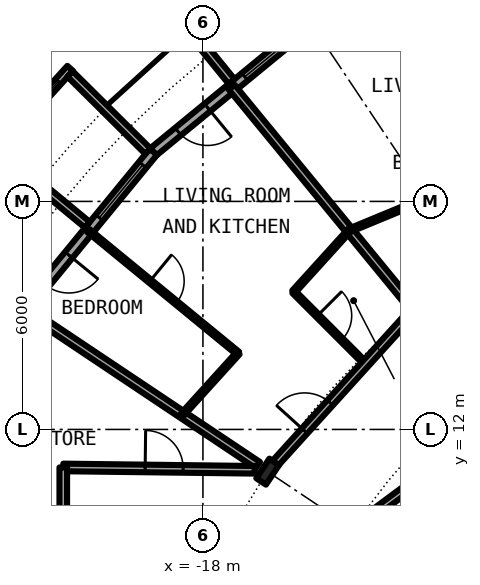
"""IFC4 building model, lengths in metres.
Left out: names, types, materials, properties, quantities, classifications, styles, units other than length and angle.
Written with IfcOpenShell. Run it as: python <this file> out.ifc"""

import sys

from ifc_helpers import new_model, si_unit, direction, frame, frame_2d, origin, origin_2d, place, context, subcontext, project, spatial, rectangle, circle, i_section, extrude, element, fill, save


model = new_model("IFC4")
c1 = context("Model", 3, precision=1e-05, world=origin(), true_north=direction((0.0, 1.0)))
c2 = subcontext(c1, "Body", "Model", "MODEL_VIEW")
j1 = project(units=[si_unit("LENGTHUNIT", "METRE"), si_unit("PLANEANGLEUNIT", "RADIAN")], contexts=[c1])
p1 = place(None, origin())
s1 = spatial("IfcSite", under=j1, at=p1, CompositionType="ELEMENT")
p2 = place(p1, origin())
s2 = spatial("IfcBuilding", under=s1, at=p2, CompositionType="ELEMENT")
p3 = place(p2, frame((0.0, 0.0, 47.2)))
s3 = spatial("IfcBuildingStorey", under=s2, at=p3, CompositionType="ELEMENT", Elevation=47.2)
p4 = place(p3, frame((-16.297, 10.889, 0.0), z_axis=(0.0, 0.0, 1.0), x_axis=(-0.831469612303, 0.55557023302, 0.0)))
e1 = element("IfcColumn", 1, at=p4, inside=s3, PredefinedType="COLUMN", context=c2, shape_type="SweptSolid", body=[
    extrude(i_section(OverallWidth=0.305, OverallDepth=0.62, WebThickness=0.021, FlangeThickness=0.04, FilletRadius=0.027, at=origin_2d()), origin(), (0.0, 0.0, 1.0), 3.05),
])
p5 = place(p3, frame((-15.167, 22.699, 0.0), z_axis=(0.0, 0.0, 1.0), x_axis=(-0.773019449054, -0.634382322723, 0.0)))
e2 = element("IfcWall", 2, at=p5, inside=s3, PredefinedType="SOLIDWALL", context=c2, shape_type="SweptSolid", body=[
    extrude(rectangle(XDim=5.352, YDim=0.25, at=frame_2d((2.676, 0.0))), origin(), (0.0, 0.0, 1.0), 2.7),
])
p6 = place(p5, frame((0.441, 0.0, 0.3)))
e3 = element("IfcOpeningElement", 3, at=p6, cuts=e2, PredefinedType="OPENING", context=c2, shape_type="SweptSolid", body=[
    extrude(rectangle(XDim=1.8, YDim=2.1, at=frame_2d((0.9, 1.05))), frame((0.0, 0.135, 0.0), z_axis=(0.0, -1.0, 0.0), x_axis=(1.0, 0.0, 0.0)), (0.0, 0.0, 1.0), 0.27),
])
p7 = place(p5, frame((3.51, 0.0, 0.0)))
e4 = element("IfcOpeningElement", 4, at=p7, cuts=e2, PredefinedType="OPENING", context=c2, shape_type="SweptSolid", body=[
    extrude(rectangle(XDim=1.0, YDim=2.2, at=frame_2d((0.5, 1.1))), frame((0.0, 0.135, 0.0), z_axis=(0.0, -1.0, 0.0), x_axis=(1.0, 0.0, 0.0)), (0.0, 0.0, 1.0), 0.27),
])
p8 = place(p3, frame((-17.246, 21.155, -0.03), z_axis=(0.0, 0.0, 1.0), x_axis=(-0.631741648902, 0.775179004516, 0.0)))
e5 = element("IfcWall", 5, at=p8, inside=s3, PredefinedType="SOLIDWALL", context=c2, shape_type="SweptSolid", body=[
    extrude(rectangle(XDim=3.006, YDim=0.2, at=frame_2d((1.503, 0.0))), origin(), (0.0, 0.0, 1.0), 2.73),
])
p9 = place(p3, frame((-19.304, 19.304, 0.0), z_axis=(0.0, 0.0, 1.0), x_axis=(-0.634382322723, -0.773019449054, 0.0)))
e6 = element("IfcWall", 6, at=p9, inside=s3, PredefinedType="SOLIDWALL", context=c2, shape_type="SweptSolid", body=[
    extrude(rectangle(XDim=5.352, YDim=0.25, at=frame_2d((2.676, 0.0))), origin(), (0.0, 0.0, 1.0), 2.7),
])
p10 = place(p9, frame((0.441, 0.0, 0.3)))
e7 = element("IfcOpeningElement", 7, at=p10, cuts=e6, PredefinedType="OPENING", context=c2, shape_type="SweptSolid", body=[
    extrude(rectangle(XDim=1.8, YDim=2.1, at=frame_2d((0.9, 1.05))), frame((0.0, 0.135, 0.0), z_axis=(0.0, -1.0, 0.0), x_axis=(1.0, 0.0, 0.0)), (0.0, 0.0, 1.0), 0.27),
])
p11 = place(p9, frame((3.51, 0.0, 0.0)))
e8 = element("IfcOpeningElement", 8, at=p11, cuts=e6, PredefinedType="OPENING", context=c2, shape_type="SweptSolid", body=[
    extrude(rectangle(XDim=1.0, YDim=2.2, at=frame_2d((0.5, 1.1))), frame((0.0, 0.135, 0.0), z_axis=(0.0, -1.0, 0.0), x_axis=(1.0, 0.0, 0.0)), (0.0, 0.0, 1.0), 0.27),
])
p12 = place(p3, frame((-21.493, 21.5, -0.03), z_axis=(0.0, 0.0, 1.0), x_axis=(-0.671506829416, -0.740998365753, 0.0)))
e9 = element("IfcWall", 9, at=p12, inside=s3, PredefinedType="SOLIDWALL", context=c2, shape_type="SweptSolid", body=[
    extrude(rectangle(XDim=2.993, YDim=0.2, at=frame_2d((1.497, 0.0))), origin(), (0.0, 0.0, 1.0), 2.73),
])
p13 = place(p12, frame((0.457, 0.0, 0.33)))
e10 = element("IfcOpeningElement", 10, at=p13, cuts=e9, PredefinedType="OPENING", context=c2, shape_type="SweptSolid", body=[
    extrude(circle(Radius=1.04, at=frame_2d((1.04, 1.04))), frame((0.0, 0.11, 0.0), z_axis=(0.0, -1.0, 0.0), x_axis=(1.0, 0.0, 0.0)), (0.0, 0.0, 1.0), 0.22),
])
p14 = place(p3, frame((-19.45, 19.323, -0.03), z_axis=(0.0, 0.0, 1.0), x_axis=(-0.709727076896, 0.704476739375, 0.0)))
e11 = element("IfcWall", 11, at=p14, inside=s3, PredefinedType="SOLIDWALL", context=c2, shape_type="SweptSolid", body=[
    extrude(rectangle(XDim=2.883, YDim=0.2, at=frame_2d((1.441, 0.0))), origin(), (0.0, 0.0, 1.0), 2.73),
])
p15 = place(p3, frame((-21.041, 17.384, -0.03), z_axis=(0.0, 0.0, 1.0), x_axis=(-0.770784861449, 0.63709551667, 0.0)))
e12 = element("IfcWall", 12, at=p15, inside=s3, PredefinedType="SOLIDWALL", context=c2, shape_type="SweptSolid", body=[
    extrude(rectangle(XDim=3.006, YDim=0.2, at=frame_2d((1.503, 0.0))), origin(), (0.0, 0.0, 1.0), 2.73),
])
p16 = place(p3, frame((-22.596, 15.097, 0.0), z_axis=(0.0, 0.0, 1.0), x_axis=(0.831507055747, -0.555514190857, 0.0)))
e13 = element("IfcWall", 13, at=p16, inside=s3, PredefinedType="PARTITIONING", context=c2, shape_type="SweptSolid", body=[
    extrude(rectangle(XDim=7.265, YDim=0.2, at=frame_2d((3.633, 0.0))), origin(), (0.0, 0.0, 1.0), 2.7),
])
p17 = place(p3, frame((-21.014, 17.231, 0.0), z_axis=(0.0, 0.0, 1.0), x_axis=(0.773219330916, -0.634138680651, 0.0)))
e14 = element("IfcWall", 14, at=p17, inside=s3, PredefinedType="PARTITIONING", context=c2, shape_type="SweptSolid", body=[
    extrude(rectangle(XDim=5.089, YDim=0.1, at=frame_2d((2.544, 0.0))), origin(), (0.0, 0.0, 1.0), 2.7),
])
p18 = place(p17, frame((2.095, 0.0, 0.0)))
e15 = element("IfcOpeningElement", 15, at=p18, cuts=e14, PredefinedType="OPENING", context=c2, shape_type="SweptSolid", body=[
    extrude(rectangle(XDim=0.9, YDim=2.3, at=frame_2d((0.45, 1.15))), frame((0.0, 0.06, 0.0), z_axis=(0.0, -1.0, 0.0), x_axis=(1.0, 0.0, 0.0)), (0.0, 0.0, 1.0), 0.12),
])
p19 = place(p3, frame((-17.243, 21.005, 0.0), z_axis=(0.0, 0.0, 1.0), x_axis=(0.63447412651, -0.772944100689, 0.0)))
e16 = element("IfcWall", 16, at=p19, inside=s3, PredefinedType="PARTITIONING", context=c2, shape_type="SweptSolid", body=[
    extrude(rectangle(XDim=7.576, YDim=0.2, at=frame_2d((3.788, 0.0))), origin(), (0.0, 0.0, 1.0), 2.7),
])
p20 = place(p3, frame((-15.612, 15.622, 0.0), z_axis=(0.0, 0.0, 1.0), x_axis=(0.706741540154, -0.707471833659, 0.0)))
e17 = element("IfcWall", 17, at=p20, inside=s3, PredefinedType="PARTITIONING", context=c2, shape_type="SweptSolid", body=[
    extrude(rectangle(XDim=2.674, YDim=0.1, at=frame_2d((1.337, 0.0))), origin(), (0.0, 0.0, 1.0), 2.7),
])
p21 = place(p20, frame((0.887, 0.0, 0.0)))
e18 = element("IfcOpeningElement", 18, at=p21, cuts=e17, PredefinedType="OPENING", context=c2, shape_type="SweptSolid", body=[
    extrude(rectangle(XDim=0.9, YDim=2.3, at=frame_2d((0.45, 1.15))), frame((0.0, 0.06, 0.0), z_axis=(0.0, -1.0, 0.0), x_axis=(1.0, 0.0, 0.0)), (0.0, 0.0, 1.0), 0.12),
])
p22 = place(p3, frame((-21.675, 11.0, 0.0), z_axis=(0.0, 0.0, 1.0), x_axis=(0.99992425795, -0.012307654658, 0.0)))
e19 = element("IfcWall", 19, at=p22, inside=s3, PredefinedType="PARTITIONING", context=c2, shape_type="SweptSolid", body=[
    extrude(rectangle(XDim=5.039, YDim=0.2, at=frame_2d((2.519, 0.0))), origin(), (0.0, 0.0, 1.0), 2.7),
])
p23 = place(p22, frame((2.155, 0.0, 0.0)))
e20 = element("IfcOpeningElement", 20, at=p23, cuts=e19, PredefinedType="OPENING", context=c2, shape_type="SweptSolid", body=[
    extrude(rectangle(XDim=1.0, YDim=2.3, at=frame_2d((0.5, 1.15))), frame((0.0, 0.11, 0.0), z_axis=(0.0, -1.0, 0.0), x_axis=(1.0, 0.0, 0.0)), (0.0, 0.0, 1.0), 0.22),
])
p24 = place(p3, frame((-14.037, 9.4, 0.0), z_axis=(0.0, 0.0, 1.0), x_axis=(0.803202106898, 0.595706618626, 0.0)))
e21 = element("IfcWall", 21, at=p24, inside=s3, PredefinedType="PARTITIONING", context=c2, shape_type="SweptSolid", body=[
    extrude(rectangle(XDim=11.368, YDim=0.2, at=frame_2d((5.684, 0.0))), origin(), (0.0, 0.0, 1.0), 2.7),
])
p25 = place(p24, frame((5.988, 0.0, 0.0)))
e22 = element("IfcOpeningElement", 22, at=p25, cuts=e21, PredefinedType="OPENING", context=c2, shape_type="SweptSolid", body=[
    extrude(rectangle(XDim=1.0, YDim=2.3, at=frame_2d((0.5, 1.15))), frame((0.0, 0.11, 0.0), z_axis=(0.0, -1.0, 0.0), x_axis=(1.0, 0.0, 0.0)), (0.0, 0.0, 1.0), 0.22),
])
p26 = place(p3, frame((-16.193, 11.003, 0.0), z_axis=(0.0, 0.0, 1.0), x_axis=(0.671514934772, 0.740991020444, 0.0)))
e23 = element("IfcWall", 23, at=p26, inside=s3, PredefinedType="PARTITIONING", context=c2, shape_type="SweptSolid", body=[
    extrude(rectangle(XDim=5.598, YDim=0.2, at=frame_2d((2.799, 0.0))), origin(), (0.0, 0.0, 1.0), 2.38),
])
p27 = place(p26, frame((1.293, 0.0, 0.0)))
e24 = element("IfcOpeningElement", 24, at=p27, cuts=e23, PredefinedType="OPENING", context=c2, shape_type="SweptSolid", body=[
    extrude(rectangle(XDim=1.0, YDim=2.3, at=frame_2d((0.5, 1.15))), frame((0.0, 0.11, 0.0), z_axis=(0.0, -1.0, 0.0), x_axis=(1.0, 0.0, 0.0)), (0.0, 0.0, 1.0), 0.22),
])
p28 = place(p3, frame((-14.149, 17.236, 0.0), z_axis=(0.0, 0.0, 1.0), x_axis=(0.923874819588, 0.382694810171, 0.0)))
e25 = element("IfcWall", 25, at=p28, inside=s3, PredefinedType="PARTITIONING", context=c2, shape_type="SweptSolid", body=[
    extrude(rectangle(XDim=2.158, YDim=0.1, at=frame_2d((1.079, 0.0))), origin(), (0.0, 0.0, 1.0), 2.7),
])
p29 = place(p3, frame((-21.675, 9.4, 0.0), z_axis=(0.0, 0.0, 1.0), x_axis=(0.0, 1.0, 0.0)))
e26 = element("IfcWall", 26, at=p29, inside=s3, PredefinedType="PARTITIONING", context=c2, shape_type="SweptSolid", body=[
    extrude(rectangle(XDim=1.6, YDim=0.2, at=frame_2d((0.8, 0.0))), origin(), (0.0, 0.0, 1.0), 2.7),
])
for number, where, z_axis, x_axis in (
    (27, (-18.538, 12.394, 0.0), (0.0, 0.0, 1.0), (0.672, 0.741, 0.0)),
    (28, (-15.613, 15.621, 0.0), (0.0, 0.0, 1.0), (0.672, 0.741, 0.0)),
):
    element("IfcWall", number, at=place(p3, frame(where, z_axis=z_axis, x_axis=x_axis)), inside=s3, PredefinedType="PARTITIONING", context=c2, shape_type="SweptSolid", body=[
        extrude(rectangle(XDim=2.183, YDim=0.1, at=frame_2d((1.091, 0.0))), origin(), (0.0, 0.0, 1.0), 2.7),
    ])
p30 = place(p6, origin())
e29 = element("IfcWindow", 29, at=p30, inside=s3, PartitioningType="SINGLE_PANEL", PredefinedType="WINDOW", context=c2, shape_type="SweptSolid", body=[
    extrude(rectangle(XDim=1.8, YDim=2.1, at=frame_2d((0.9, 1.05))), frame((0.0, 0.03, 0.0), z_axis=(0.0, -1.0, 0.0), x_axis=(1.0, 0.0, 0.0)), (0.0, 0.0, 1.0), 0.06),
])
fill(e3, e29)
p31 = place(p7, origin())
e30 = element("IfcDoor", 30, at=p31, inside=s3, OperationType="SINGLE_SWING_LEFT", PredefinedType="DOOR", context=c2, shape_type="SweptSolid", body=[
    extrude(rectangle(XDim=1.0, YDim=2.2, at=frame_2d((0.5, 1.1))), frame((0.0, 0.025, 0.0), z_axis=(0.0, -1.0, 0.0), x_axis=(1.0, 0.0, 0.0)), (0.0, 0.0, 1.0), 0.05),
])
fill(e4, e30)
p32 = place(p10, origin())
e31 = element("IfcWindow", 31, at=p32, inside=s3, PartitioningType="SINGLE_PANEL", PredefinedType="WINDOW", context=c2, shape_type="SweptSolid", body=[
    extrude(rectangle(XDim=1.8, YDim=2.1, at=frame_2d((0.9, 1.05))), frame((0.0, 0.03, 0.0), z_axis=(0.0, -1.0, 0.0), x_axis=(1.0, 0.0, 0.0)), (0.0, 0.0, 1.0), 0.06),
])
fill(e7, e31)
p33 = place(p13, origin())
e32 = element("IfcWindow", 32, at=p33, inside=s3, PartitioningType="SINGLE_PANEL", PredefinedType="WINDOW", context=c2, shape_type="SweptSolid", body=[
    extrude(circle(Radius=1.04, at=frame_2d((1.04, 1.04))), frame((0.0, 0.03, 0.0), z_axis=(0.0, -1.0, 0.0), x_axis=(1.0, 0.0, 0.0)), (0.0, 0.0, 1.0), 0.06),
])
fill(e10, e32)
p34 = place(p11, origin())
e33 = element("IfcDoor", 33, at=p34, inside=s3, OperationType="SINGLE_SWING_LEFT", PredefinedType="DOOR", context=c2, shape_type="SweptSolid", body=[
    extrude(rectangle(XDim=1.0, YDim=2.2, at=frame_2d((0.5, 1.1))), frame((0.0, 0.025, 0.0), z_axis=(0.0, -1.0, 0.0), x_axis=(1.0, 0.0, 0.0)), (0.0, 0.0, 1.0), 0.05),
])
fill(e8, e33)
p35 = place(p27, origin())
e34 = element("IfcDoor", 34, at=p35, inside=s3, OperationType="SINGLE_SWING_LEFT", PredefinedType="DOOR", context=c2, shape_type="SweptSolid", body=[
    extrude(rectangle(XDim=1.0, YDim=2.3, at=frame_2d((0.5, 1.15))), frame((0.0, 0.025, 0.0), z_axis=(0.0, -1.0, 0.0), x_axis=(1.0, 0.0, 0.0)), (0.0, 0.0, 1.0), 0.05),
])
fill(e24, e34)
p36 = place(p21, origin())
e35 = element("IfcDoor", 35, at=p36, inside=s3, OperationType="SINGLE_SWING_RIGHT", PredefinedType="DOOR", context=c2, shape_type="SweptSolid", body=[
    extrude(rectangle(XDim=0.9, YDim=2.3, at=frame_2d((0.45, 1.15))), frame((0.0, 0.025, 0.0), z_axis=(0.0, -1.0, 0.0), x_axis=(1.0, 0.0, 0.0)), (0.0, 0.0, 1.0), 0.05),
])
fill(e18, e35)
p37 = place(p18, origin())
e36 = element("IfcDoor", 36, at=p37, inside=s3, OperationType="SINGLE_SWING_RIGHT", PredefinedType="DOOR", context=c2, shape_type="SweptSolid", body=[
    extrude(rectangle(XDim=0.9, YDim=2.3, at=frame_2d((0.45, 1.15))), frame((0.0, 0.025, 0.0), z_axis=(0.0, -1.0, 0.0), x_axis=(1.0, 0.0, 0.0)), (0.0, 0.0, 1.0), 0.05),
])
fill(e15, e36)
p38 = place(p23, origin())
e37 = element("IfcDoor", 37, at=p38, inside=s3, OperationType="SINGLE_SWING_RIGHT", PredefinedType="DOOR", context=c2, shape_type="SweptSolid", body=[
    extrude(rectangle(XDim=1.0, YDim=2.3, at=frame_2d((0.5, 1.15))), frame((0.0, 0.025, 0.0), z_axis=(0.0, -1.0, 0.0), x_axis=(1.0, 0.0, 0.0)), (0.0, 0.0, 1.0), 0.05),
])
fill(e20, e37)
save(model, sys.argv[1])
